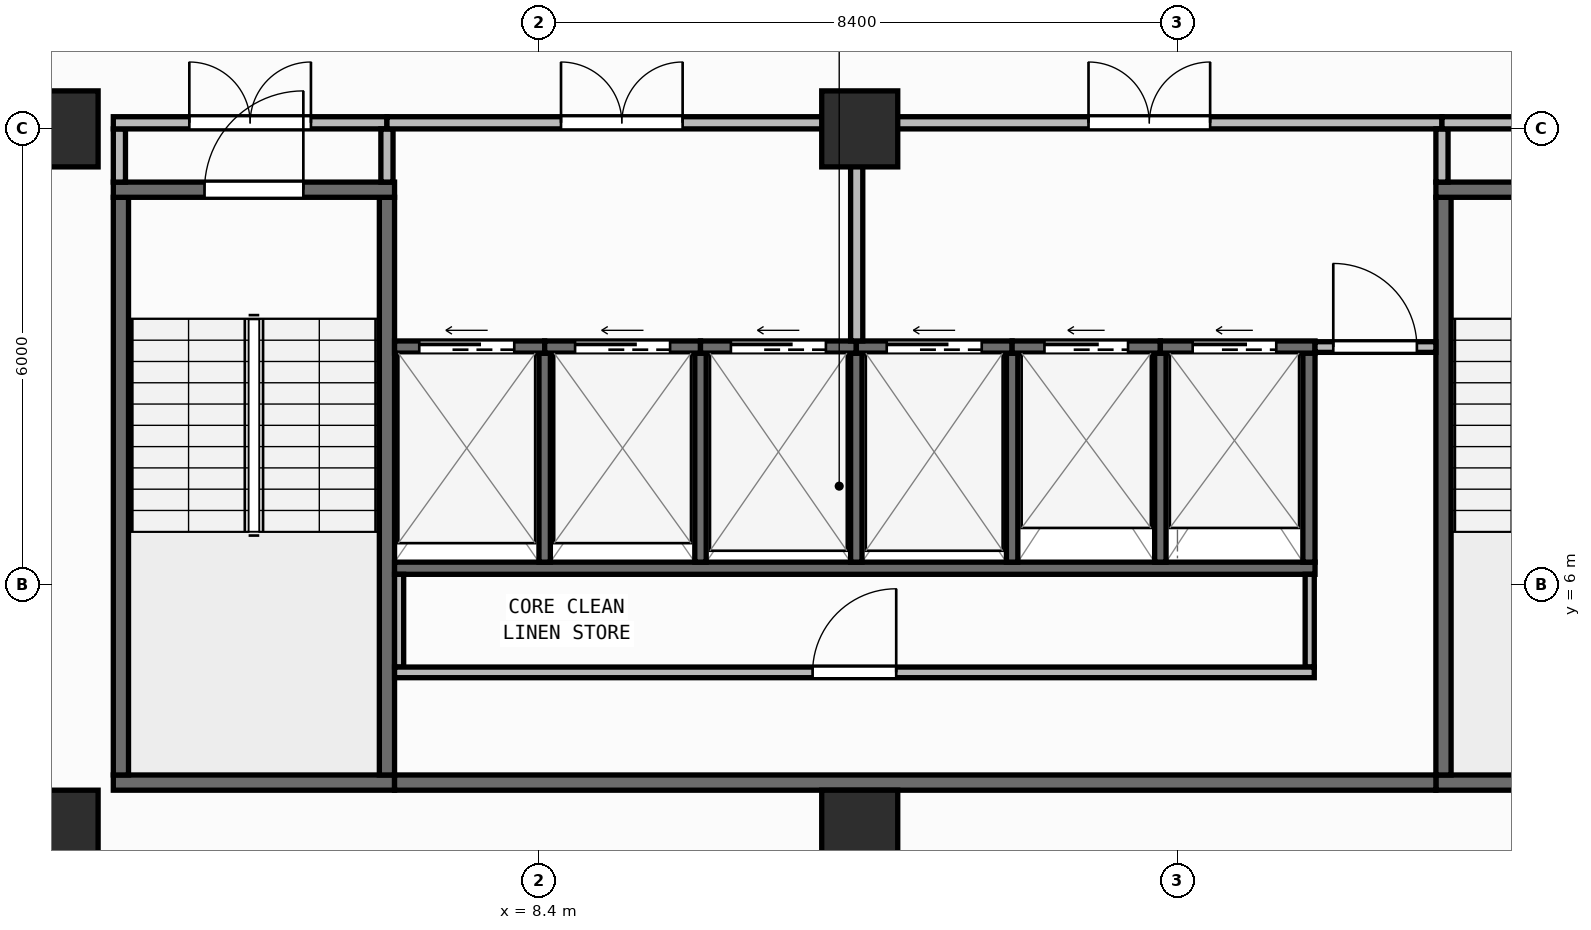
"""IFC4 building model, lengths in metres.
Left out: names, types, materials, properties, quantities, classifications, styles, units other than length and angle.
Written with IfcOpenShell. Run it as: python <this file> out.ifc"""

import sys

from ifc_helpers import new_model, si_unit, direction, frame, frame_2d, origin, origin_2d, place, context, subcontext, project, spatial, rectangle, extrude, element, fill, save


model = new_model("IFC4")
c1 = context("Model", 3, precision=1e-05, world=origin(), true_north=direction((0.0, 1.0)))
c2 = subcontext(c1, "Body", "Model", "MODEL_VIEW")
j1 = project(units=[si_unit("LENGTHUNIT", "METRE"), si_unit("PLANEANGLEUNIT", "RADIAN")], contexts=[c1])
p1 = place(None, origin())
s1 = spatial("IfcSite", under=j1, at=p1, CompositionType="ELEMENT")
p2 = place(p1, origin())
s2 = spatial("IfcBuilding", under=s1, at=p2, CompositionType="ELEMENT")
p3 = place(p2, frame((0.0, 0.0, 223.7)))
s3 = spatial("IfcBuildingStorey", under=s2, at=p3, CompositionType="ELEMENT", Elevation=223.7)
for number, where, z_axis, x_axis in (
    (1, (2.1, 2.8, 0.0), (0.0, 0.0, 1.0), (1.0, 0.0, 0.0)),
    (2, (12.62, 2.8, 0.0), (0.0, 0.0, 1.0), (1.0, 0.0, 0.0)),
    (3, (2.1, 12.0, 0.0), (0.0, 0.0, 1.0), (1.0, 0.0, 0.0)),
    (4, (12.62, 12.0, 0.0), (0.0, 0.0, 1.0), (1.0, 0.0, 0.0)),
):
    element("IfcColumn", number, at=place(p3, frame(where, z_axis=z_axis, x_axis=x_axis)), inside=s3, PredefinedType="COLUMN", context=c2, shape_type="SweptSolid", body=[
        extrude(rectangle(XDim=1.0, YDim=1.0, at=origin_2d()), origin(), (0.0, 0.0, 1.0), 3.95),
    ])
p4 = place(p3, frame((2.66, 0.174, 0.0), z_axis=(0.0, 0.0, 1.0), x_axis=(0.996634028439, 0.081979347142, 0.0)))
e5 = element("IfcWall", 5, at=p4, inside=s3, PredefinedType="STANDARD", context=c2, shape_type="SweptSolid", body=[
    extrude(rectangle(XDim=46.035, YDim=0.26, at=frame_2d((23.018, 0.0))), origin(), (0.0, 0.0, 1.0), 3.71),
])
p5 = place(p4, frame((21.817, 0.0, 0.9)))
e6 = element("IfcOpeningElement", 6, at=p5, cuts=e5, PredefinedType="OPENING", context=c2, shape_type="SweptSolid", body=[
    extrude(rectangle(XDim=2.4, YDim=1.65, at=frame_2d((1.2, 0.825))), frame((0.0, 0.14, 0.0), z_axis=(0.0, -1.0, 0.0), x_axis=(1.0, 0.0, 0.0)), (0.0, 0.0, 1.0), 0.28),
])
p6 = place(p3, frame((2.8, 3.4, 0.0), z_axis=(0.0, 0.0, 1.0), x_axis=(1.0, 0.0, 0.0)))
e7 = element("IfcWall", 7, at=p6, inside=s3, PredefinedType="SHEAR", context=c2, shape_type="SweptSolid", body=[
    extrude(rectangle(XDim=3.7, YDim=0.2, at=frame_2d((1.85, 0.0))), origin(), (0.0, 0.0, 1.0), 3.71),
])
for number, where, z_axis, x_axis in (
    (8, (2.9, 3.5, 0.0), (0.0, 0.0, 1.0), (0.0, 1.0, 0.0)),
    (9, (6.4, 3.5, 0.0), (0.0, 0.0, 1.0), (0.0, 1.0, 0.0)),
):
    element("IfcWall", number, at=place(p3, frame(where, z_axis=z_axis, x_axis=x_axis)), inside=s3, PredefinedType="SHEAR", context=c2, shape_type="SweptSolid", body=[
        extrude(rectangle(XDim=7.6, YDim=0.2, at=frame_2d((3.8, 0.0))), origin(), (0.0, 0.0, 1.0), 3.71),
    ])
p7 = place(p3, frame((2.8, 11.2, 0.0), z_axis=(0.0, 0.0, 1.0), x_axis=(1.0, 0.0, 0.0)))
e10 = element("IfcWall", 10, at=p7, inside=s3, PredefinedType="SHEAR", context=c2, shape_type="SweptSolid", body=[
    extrude(rectangle(XDim=3.7, YDim=0.2, at=frame_2d((1.85, 0.0))), origin(), (0.0, 0.0, 1.0), 3.71),
])
p8 = place(p7, frame((1.2, 0.0, 0.0)))
e11 = element("IfcOpeningElement", 11, at=p8, cuts=e10, PredefinedType="OPENING", context=c2, shape_type="SweptSolid", body=[
    extrude(rectangle(XDim=1.3, YDim=2.15, at=frame_2d((0.65, 1.075))), frame((0.0, 0.11, 0.0), z_axis=(0.0, -1.0, 0.0), x_axis=(1.0, 0.0, 0.0)), (0.0, 0.0, 1.0), 0.22),
])
p9 = place(p3, frame((20.2, 3.4, 0.0), z_axis=(0.0, 0.0, 1.0), x_axis=(1.0, 0.0, 0.0)))
e12 = element("IfcWall", 12, at=p9, inside=s3, PredefinedType="SHEAR", context=c2, shape_type="SweptSolid", body=[
    extrude(rectangle(XDim=3.7, YDim=0.2, at=frame_2d((1.85, 0.0))), origin(), (0.0, 0.0, 1.0), 3.71),
])
p10 = place(p3, frame((20.3, 3.5, 0.0), z_axis=(0.0, 0.0, 1.0), x_axis=(0.0, 1.0, 0.0)))
e13 = element("IfcWall", 13, at=p10, inside=s3, PredefinedType="SHEAR", context=c2, shape_type="SweptSolid", body=[
    extrude(rectangle(XDim=7.6, YDim=0.2, at=frame_2d((3.8, 0.0))), origin(), (0.0, 0.0, 1.0), 3.71),
])
p11 = place(p3, frame((20.2, 11.2, 0.0), z_axis=(0.0, 0.0, 1.0), x_axis=(1.0, 0.0, 0.0)))
e14 = element("IfcWall", 14, at=p11, inside=s3, PredefinedType="SHEAR", context=c2, shape_type="SweptSolid", body=[
    extrude(rectangle(XDim=3.7, YDim=0.2, at=frame_2d((1.85, 0.0))), origin(), (0.0, 0.0, 1.0), 3.71),
])
p12 = place(p11, frame((1.2, 0.0, 0.0)))
e15 = element("IfcOpeningElement", 15, at=p12, cuts=e14, PredefinedType="OPENING", context=c2, shape_type="SweptSolid", body=[
    extrude(rectangle(XDim=1.3, YDim=2.15, at=frame_2d((0.65, 1.075))), frame((0.0, 0.11, 0.0), z_axis=(0.0, -1.0, 0.0), x_axis=(1.0, 0.0, 0.0)), (0.0, 0.0, 1.0), 0.22),
])
p13 = place(p3, frame((6.5, 3.4, 0.0), z_axis=(0.0, 0.0, 1.0), x_axis=(1.0, 0.0, 0.0)))
e16 = element("IfcWall", 16, at=p13, inside=s3, PredefinedType="SHEAR", context=c2, shape_type="SweptSolid", body=[
    extrude(rectangle(XDim=13.7, YDim=0.2, at=frame_2d((6.85, 0.0))), origin(), (0.0, 0.0, 1.0), 3.71),
])
p14 = place(p3, frame((6.5, 6.22, 0.0), z_axis=(0.0, 0.0, 1.0), x_axis=(1.0, 0.0, 0.0)))
e17 = element("IfcWall", 17, at=p14, inside=s3, PredefinedType="SHEAR", context=c2, shape_type="SweptSolid", body=[
    extrude(rectangle(XDim=12.11, YDim=0.16, at=frame_2d((6.055, 0.0))), origin(), (0.0, 0.0, 1.0), 3.71),
])
p15 = place(p3, frame((18.53, 6.3, 0.0), z_axis=(0.0, 0.0, 1.0), x_axis=(0.0, 1.0, 0.0)))
e18 = element("IfcWall", 18, at=p15, inside=s3, PredefinedType="SHEAR", context=c2, shape_type="SweptSolid", body=[
    extrude(rectangle(XDim=2.75, YDim=0.16, at=frame_2d((1.375, 0.0))), origin(), (0.0, 0.0, 1.0), 3.71),
])
for number, where, z_axis, x_axis in (
    (19, (8.475, 6.3, 0.0), (0.0, 0.0, 1.0), (0.0, 1.0, 0.0)),
    (20, (10.525, 6.3, 0.0), (0.0, 0.0, 1.0), (0.0, 1.0, 0.0)),
    (21, (12.575, 6.3, 0.0), (0.0, 0.0, 1.0), (0.0, 1.0, 0.0)),
    (22, (14.625, 6.3, 0.0), (0.0, 0.0, 1.0), (0.0, 1.0, 0.0)),
    (23, (16.575, 6.3, 0.0), (0.0, 0.0, 1.0), (0.0, 1.0, 0.0)),
):
    element("IfcWall", number, at=place(p3, frame(where, z_axis=z_axis, x_axis=x_axis)), inside=s3, PredefinedType="SHEAR", context=c2, shape_type="SweptSolid", body=[
        extrude(rectangle(XDim=2.75, YDim=0.15, at=frame_2d((1.375, 0.0))), origin(), (0.0, 0.0, 1.0), 3.71),
    ])
p16 = place(p3, frame((6.5, 9.13, 0.0), z_axis=(0.0, 0.0, 1.0), x_axis=(1.0, 0.0, 0.0)))
e24 = element("IfcWall", 24, at=p16, inside=s3, PredefinedType="SHEAR", context=c2, shape_type="SweptSolid", body=[
    extrude(rectangle(XDim=1.975, YDim=0.16, at=frame_2d((0.988, 0.0))), origin(), (0.0, 0.0, 1.0), 3.71),
])
p17 = place(p16, frame((0.325, 0.0, 0.0)))
e25 = element("IfcOpeningElement", 25, at=p17, cuts=e24, PredefinedType="OPENING", context=c2, shape_type="SweptSolid", body=[
    extrude(rectangle(XDim=1.25, YDim=2.15, at=frame_2d((0.625, 1.075))), frame((0.0, 0.09, 0.0), z_axis=(0.0, -1.0, 0.0), x_axis=(1.0, 0.0, 0.0)), (0.0, 0.0, 1.0), 0.18),
])
p18 = place(p3, frame((8.475, 9.13, 0.0), z_axis=(0.0, 0.0, 1.0), x_axis=(1.0, 0.0, 0.0)))
e26 = element("IfcWall", 26, at=p18, inside=s3, PredefinedType="SHEAR", context=c2, shape_type="SweptSolid", body=[
    extrude(rectangle(XDim=2.05, YDim=0.16, at=frame_2d((1.025, 0.0))), origin(), (0.0, 0.0, 1.0), 3.71),
])
p19 = place(p18, frame((0.4, 0.0, 0.0)))
e27 = element("IfcOpeningElement", 27, at=p19, cuts=e26, PredefinedType="OPENING", context=c2, shape_type="SweptSolid", body=[
    extrude(rectangle(XDim=1.25, YDim=2.15, at=frame_2d((0.625, 1.075))), frame((0.0, 0.09, 0.0), z_axis=(0.0, -1.0, 0.0), x_axis=(1.0, 0.0, 0.0)), (0.0, 0.0, 1.0), 0.18),
])
p20 = place(p3, frame((10.525, 9.13, 0.0), z_axis=(0.0, 0.0, 1.0), x_axis=(1.0, 0.0, 0.0)))
e28 = element("IfcWall", 28, at=p20, inside=s3, PredefinedType="SHEAR", context=c2, shape_type="SweptSolid", body=[
    extrude(rectangle(XDim=2.05, YDim=0.16, at=frame_2d((1.025, 0.0))), origin(), (0.0, 0.0, 1.0), 3.71),
])
p21 = place(p20, frame((0.4, 0.0, 0.0)))
e29 = element("IfcOpeningElement", 29, at=p21, cuts=e28, PredefinedType="OPENING", context=c2, shape_type="SweptSolid", body=[
    extrude(rectangle(XDim=1.25, YDim=2.15, at=frame_2d((0.625, 1.075))), frame((0.0, 0.09, 0.0), z_axis=(0.0, -1.0, 0.0), x_axis=(1.0, 0.0, 0.0)), (0.0, 0.0, 1.0), 0.18),
])
p22 = place(p3, frame((12.575, 9.13, 0.0), z_axis=(0.0, 0.0, 1.0), x_axis=(1.0, 0.0, 0.0)))
e30 = element("IfcWall", 30, at=p22, inside=s3, PredefinedType="SHEAR", context=c2, shape_type="SweptSolid", body=[
    extrude(rectangle(XDim=2.05, YDim=0.16, at=frame_2d((1.025, 0.0))), origin(), (0.0, 0.0, 1.0), 3.71),
])
p23 = place(p22, frame((0.4, 0.0, 0.0)))
e31 = element("IfcOpeningElement", 31, at=p23, cuts=e30, PredefinedType="OPENING", context=c2, shape_type="SweptSolid", body=[
    extrude(rectangle(XDim=1.25, YDim=2.15, at=frame_2d((0.625, 1.075))), frame((0.0, 0.09, 0.0), z_axis=(0.0, -1.0, 0.0), x_axis=(1.0, 0.0, 0.0)), (0.0, 0.0, 1.0), 0.18),
])
p24 = place(p3, frame((14.625, 9.13, 0.0), z_axis=(0.0, 0.0, 1.0), x_axis=(1.0, 0.0, 0.0)))
e32 = element("IfcWall", 32, at=p24, inside=s3, PredefinedType="SHEAR", context=c2, shape_type="SweptSolid", body=[
    extrude(rectangle(XDim=1.95, YDim=0.16, at=frame_2d((0.975, 0.0))), origin(), (0.0, 0.0, 1.0), 3.71),
])
p25 = place(p24, frame((0.425, 0.0, 0.0)))
e33 = element("IfcOpeningElement", 33, at=p25, cuts=e32, PredefinedType="OPENING", context=c2, shape_type="SweptSolid", body=[
    extrude(rectangle(XDim=1.1, YDim=2.15, at=frame_2d((0.55, 1.075))), frame((0.0, 0.09, 0.0), z_axis=(0.0, -1.0, 0.0), x_axis=(1.0, 0.0, 0.0)), (0.0, 0.0, 1.0), 0.18),
])
p26 = place(p3, frame((16.575, 9.13, 0.0), z_axis=(0.0, 0.0, 1.0), x_axis=(1.0, 0.0, 0.0)))
e34 = element("IfcWall", 34, at=p26, inside=s3, PredefinedType="SHEAR", context=c2, shape_type="SweptSolid", body=[
    extrude(rectangle(XDim=2.035, YDim=0.16, at=frame_2d((1.018, 0.0))), origin(), (0.0, 0.0, 1.0), 3.71),
])
p27 = place(p26, frame((0.425, 0.0, 0.0)))
e35 = element("IfcOpeningElement", 35, at=p27, cuts=e34, PredefinedType="OPENING", context=c2, shape_type="SweptSolid", body=[
    extrude(rectangle(XDim=1.1, YDim=2.15, at=frame_2d((0.55, 1.075))), frame((0.0, 0.09, 0.0), z_axis=(0.0, -1.0, 0.0), x_axis=(1.0, 0.0, 0.0)), (0.0, 0.0, 1.0), 0.18),
])
for number, where, z_axis, x_axis in (
    (36, (6.56, 4.92, 0.0), (0.0, 0.0, 1.0), (0.0, 1.0, 0.0)),
    (37, (18.54, 4.92, 0.0), (0.0, 0.0, 1.0), (0.0, 1.0, 0.0)),
):
    element("IfcWall", number, at=place(p3, frame(where, z_axis=z_axis, x_axis=x_axis)), inside=s3, PredefinedType="PARTITIONING", context=c2, shape_type="SweptSolid", body=[
        extrude(rectangle(XDim=1.22, YDim=0.12, at=frame_2d((0.61, 0.0))), origin(), (0.0, 0.0, 1.0), 3.71),
    ])
p28 = place(p3, frame((6.5, 4.85, 0.0), z_axis=(0.0, 0.0, 1.0), x_axis=(1.0, 0.0, 0.0)))
e38 = element("IfcWall", 38, at=p28, inside=s3, PredefinedType="PARTITIONING", context=c2, shape_type="SweptSolid", body=[
    extrude(rectangle(XDim=12.1, YDim=0.14, at=frame_2d((6.05, 0.0))), origin(), (0.0, 0.0, 1.0), 3.71),
])
p29 = place(p28, frame((5.5, 0.0, 0.0)))
e39 = element("IfcOpeningElement", 39, at=p29, cuts=e38, PredefinedType="OPENING", context=c2, shape_type="SweptSolid", body=[
    extrude(rectangle(XDim=1.1, YDim=2.1, at=frame_2d((0.55, 1.05))), frame((0.0, 0.08, 0.0), z_axis=(0.0, -1.0, 0.0), x_axis=(1.0, 0.0, 0.0)), (0.0, 0.0, 1.0), 0.16),
])
p30 = place(p3, frame((18.61, 9.13, 0.0), z_axis=(0.0, 0.0, 1.0), x_axis=(1.0, 0.0, 0.0)))
e40 = element("IfcWall", 40, at=p30, inside=s3, PredefinedType="PARTITIONING", context=c2, shape_type="SweptSolid", body=[
    extrude(rectangle(XDim=1.59, YDim=0.14, at=frame_2d((0.795, 0.0))), origin(), (0.0, 0.0, 1.0), 3.71),
])
p31 = place(p30, frame((0.24, 0.0, 0.0)))
e41 = element("IfcOpeningElement", 41, at=p31, cuts=e40, PredefinedType="OPENING", context=c2, shape_type="SweptSolid", body=[
    extrude(rectangle(XDim=1.1, YDim=2.1, at=frame_2d((0.55, 1.05))), frame((0.0, 0.08, 0.0), z_axis=(0.0, -1.0, 0.0), x_axis=(1.0, 0.0, 0.0)), (0.0, 0.0, 1.0), 0.16),
])
p32 = place(p3, frame((2.88, 11.3, 0.0), z_axis=(0.0, 0.0, 1.0), x_axis=(0.0, 1.0, 0.0)))
e42 = element("IfcWall", 42, at=p32, inside=s3, PredefinedType="PARTITIONING", context=c2, shape_type="SweptSolid", body=[
    extrude(rectangle(XDim=0.7, YDim=0.16, at=frame_2d((0.35, 0.0))), origin(), (0.0, 0.0, 1.0), 3.71),
])
p33 = place(p3, frame((2.8, 12.08, 0.0), z_axis=(0.0, 0.0, 1.0), x_axis=(1.0, 0.0, 0.0)))
e43 = element("IfcWall", 43, at=p33, inside=s3, PredefinedType="PARTITIONING", context=c2, shape_type="SweptSolid", body=[
    extrude(rectangle(XDim=3.6, YDim=0.16, at=frame_2d((1.8, 0.0))), origin(), (0.0, 0.0, 1.0), 3.152),
])
p34 = place(p33, frame((1.0, 0.0, 0.0)))
e44 = element("IfcOpeningElement", 44, at=p34, cuts=e43, PredefinedType="OPENING", context=c2, shape_type="SweptSolid", body=[
    extrude(rectangle(XDim=1.6, YDim=2.05, at=frame_2d((0.8, 1.025))), frame((0.0, 0.09, 0.0), z_axis=(0.0, -1.0, 0.0), x_axis=(1.0, 0.0, 0.0)), (0.0, 0.0, 1.0), 0.18),
])
p35 = place(p3, frame((6.4, 11.3, 0.0), z_axis=(0.0, 0.0, 1.0), x_axis=(0.0, 1.0, 0.0)))
e45 = element("IfcWall", 45, at=p35, inside=s3, PredefinedType="PARTITIONING", context=c2, shape_type="SweptSolid", body=[
    extrude(rectangle(XDim=0.7, YDim=0.16, at=frame_2d((0.35, 0.0))), origin(), (0.0, 0.0, 1.0), 3.71),
])
p36 = place(p3, frame((6.4, 12.08, 0.0), z_axis=(0.0, 0.0, 1.0), x_axis=(1.0, 0.0, 0.0)))
e46 = element("IfcWall", 46, at=p36, inside=s3, PredefinedType="PARTITIONING", context=c2, shape_type="SweptSolid", body=[
    extrude(rectangle(XDim=6.18, YDim=0.16, at=frame_2d((3.09, 0.0))), origin(), (0.0, 0.0, 1.0), 3.152),
])
p37 = place(p36, frame((2.29, 0.0, 0.0)))
e47 = element("IfcOpeningElement", 47, at=p37, cuts=e46, PredefinedType="OPENING", context=c2, shape_type="SweptSolid", body=[
    extrude(rectangle(XDim=1.6, YDim=2.05, at=frame_2d((0.8, 1.025))), frame((0.0, 0.09, 0.0), z_axis=(0.0, -1.0, 0.0), x_axis=(1.0, 0.0, 0.0)), (0.0, 0.0, 1.0), 0.18),
])
p38 = place(p3, frame((12.58, 9.21, 0.0), z_axis=(0.0, 0.0, 1.0), x_axis=(0.0, 1.0, 0.0)))
e48 = element("IfcWall", 48, at=p38, inside=s3, PredefinedType="PARTITIONING", context=c2, shape_type="SweptSolid", body=[
    extrude(rectangle(XDim=2.79, YDim=0.16, at=frame_2d((1.395, 0.0))), origin(), (0.0, 0.0, 1.0), 3.71),
])
p39 = place(p3, frame((12.58, 12.08, 0.0), z_axis=(0.0, 0.0, 1.0), x_axis=(1.0, 0.0, 0.0)))
e49 = element("IfcWall", 49, at=p39, inside=s3, PredefinedType="PARTITIONING", context=c2, shape_type="SweptSolid", body=[
    extrude(rectangle(XDim=7.7, YDim=0.16, at=frame_2d((3.85, 0.0))), origin(), (0.0, 0.0, 1.0), 3.152),
])
p40 = place(p39, frame((3.05, 0.0, 0.0)))
e50 = element("IfcOpeningElement", 50, at=p40, cuts=e49, PredefinedType="OPENING", context=c2, shape_type="SweptSolid", body=[
    extrude(rectangle(XDim=1.6, YDim=2.05, at=frame_2d((0.8, 1.025))), frame((0.0, 0.09, 0.0), z_axis=(0.0, -1.0, 0.0), x_axis=(1.0, 0.0, 0.0)), (0.0, 0.0, 1.0), 0.18),
])
p41 = place(p3, frame((20.28, 11.3, 0.0), z_axis=(0.0, 0.0, 1.0), x_axis=(0.0, 1.0, 0.0)))
e51 = element("IfcWall", 51, at=p41, inside=s3, PredefinedType="PARTITIONING", context=c2, shape_type="SweptSolid", body=[
    extrude(rectangle(XDim=0.7, YDim=0.16, at=frame_2d((0.35, 0.0))), origin(), (0.0, 0.0, 1.0), 3.71),
])
p42 = place(p3, frame((20.28, 12.08, 0.0), z_axis=(0.0, 0.0, 1.0), x_axis=(1.0, 0.0, 0.0)))
e52 = element("IfcWall", 52, at=p42, inside=s3, PredefinedType="PARTITIONING", context=c2, shape_type="SweptSolid", body=[
    extrude(rectangle(XDim=3.62, YDim=0.16, at=frame_2d((1.81, 0.0))), origin(), (0.0, 0.0, 1.0), 3.152),
])
p43 = place(p42, frame((1.01, 0.0, 0.0)))
e53 = element("IfcOpeningElement", 53, at=p43, cuts=e52, PredefinedType="OPENING", context=c2, shape_type="SweptSolid", body=[
    extrude(rectangle(XDim=1.6, YDim=2.05, at=frame_2d((0.8, 1.025))), frame((0.0, 0.09, 0.0), z_axis=(0.0, -1.0, 0.0), x_axis=(1.0, 0.0, 0.0)), (0.0, 0.0, 1.0), 0.18),
])
p44 = place(p8, origin())
e54 = element("IfcDoor", 54, at=p44, inside=s3, OperationType="SINGLE_SWING_RIGHT", PredefinedType="DOOR", context=c2, shape_type="SweptSolid", body=[
    extrude(rectangle(XDim=1.3, YDim=2.15, at=frame_2d((0.65, 1.075))), frame((0.0, 0.025, 0.0), z_axis=(0.0, -1.0, 0.0), x_axis=(1.0, 0.0, 0.0)), (0.0, 0.0, 1.0), 0.05),
])
fill(e11, e54)
p45 = place(p17, origin())
e55 = element("IfcDoor", 55, at=p45, inside=s3, OperationType="SLIDING_TO_LEFT", PredefinedType="DOOR", context=c2, shape_type="SweptSolid", body=[
    extrude(rectangle(XDim=1.25, YDim=2.15, at=frame_2d((0.625, 1.075))), frame((0.0, 0.025, 0.0), z_axis=(0.0, -1.0, 0.0), x_axis=(1.0, 0.0, 0.0)), (0.0, 0.0, 1.0), 0.05),
])
fill(e25, e55)
p46 = place(p19, origin())
e56 = element("IfcDoor", 56, at=p46, inside=s3, OperationType="SLIDING_TO_LEFT", PredefinedType="DOOR", context=c2, shape_type="SweptSolid", body=[
    extrude(rectangle(XDim=1.25, YDim=2.15, at=frame_2d((0.625, 1.075))), frame((0.0, 0.025, 0.0), z_axis=(0.0, -1.0, 0.0), x_axis=(1.0, 0.0, 0.0)), (0.0, 0.0, 1.0), 0.05),
])
fill(e27, e56)
p47 = place(p21, origin())
e57 = element("IfcDoor", 57, at=p47, inside=s3, OperationType="SLIDING_TO_LEFT", PredefinedType="DOOR", context=c2, shape_type="SweptSolid", body=[
    extrude(rectangle(XDim=1.25, YDim=2.15, at=frame_2d((0.625, 1.075))), frame((0.0, 0.025, 0.0), z_axis=(0.0, -1.0, 0.0), x_axis=(1.0, 0.0, 0.0)), (0.0, 0.0, 1.0), 0.05),
])
fill(e29, e57)
p48 = place(p23, origin())
e58 = element("IfcDoor", 58, at=p48, inside=s3, OperationType="SLIDING_TO_LEFT", PredefinedType="DOOR", context=c2, shape_type="SweptSolid", body=[
    extrude(rectangle(XDim=1.25, YDim=2.15, at=frame_2d((0.625, 1.075))), frame((0.0, 0.025, 0.0), z_axis=(0.0, -1.0, 0.0), x_axis=(1.0, 0.0, 0.0)), (0.0, 0.0, 1.0), 0.05),
])
fill(e31, e58)
p49 = place(p25, origin())
e59 = element("IfcDoor", 59, at=p49, inside=s3, OperationType="SLIDING_TO_LEFT", PredefinedType="DOOR", context=c2, shape_type="SweptSolid", body=[
    extrude(rectangle(XDim=1.1, YDim=2.15, at=frame_2d((0.55, 1.075))), frame((0.0, 0.025, 0.0), z_axis=(0.0, -1.0, 0.0), x_axis=(1.0, 0.0, 0.0)), (0.0, 0.0, 1.0), 0.05),
])
fill(e33, e59)
p50 = place(p27, origin())
e60 = element("IfcDoor", 60, at=p50, inside=s3, OperationType="SLIDING_TO_LEFT", PredefinedType="DOOR", context=c2, shape_type="SweptSolid", body=[
    extrude(rectangle(XDim=1.1, YDim=2.15, at=frame_2d((0.55, 1.075))), frame((0.0, 0.025, 0.0), z_axis=(0.0, -1.0, 0.0), x_axis=(1.0, 0.0, 0.0)), (0.0, 0.0, 1.0), 0.05),
])
fill(e35, e60)
p51 = place(p29, origin())
e61 = element("IfcDoor", 61, at=p51, inside=s3, OperationType="SINGLE_SWING_RIGHT", PredefinedType="DOOR", context=c2, shape_type="SweptSolid", body=[
    extrude(rectangle(XDim=1.1, YDim=2.1, at=frame_2d((0.55, 1.05))), frame((0.0, 0.025, 0.0), z_axis=(0.0, -1.0, 0.0), x_axis=(1.0, 0.0, 0.0)), (0.0, 0.0, 1.0), 0.05),
])
fill(e39, e61)
p52 = place(p31, origin())
e62 = element("IfcDoor", 62, at=p52, inside=s3, OperationType="SINGLE_SWING_LEFT", PredefinedType="DOOR", context=c2, shape_type="SweptSolid", body=[
    extrude(rectangle(XDim=1.1, YDim=2.1, at=frame_2d((0.55, 1.05))), frame((0.0, 0.025, 0.0), z_axis=(0.0, -1.0, 0.0), x_axis=(1.0, 0.0, 0.0)), (0.0, 0.0, 1.0), 0.05),
])
fill(e41, e62)
p53 = place(p34, origin())
e63 = element("IfcDoor", 63, at=p53, inside=s3, OperationType="DOUBLE_DOOR_SINGLE_SWING", PredefinedType="DOOR", context=c2, shape_type="SweptSolid", body=[
    extrude(rectangle(XDim=1.6, YDim=2.05, at=frame_2d((0.8, 1.025))), frame((0.0, 0.025, 0.0), z_axis=(0.0, -1.0, 0.0), x_axis=(1.0, 0.0, 0.0)), (0.0, 0.0, 1.0), 0.05),
])
fill(e44, e63)
p54 = place(p37, origin())
e64 = element("IfcDoor", 64, at=p54, inside=s3, OperationType="DOUBLE_DOOR_SINGLE_SWING", PredefinedType="DOOR", context=c2, shape_type="SweptSolid", body=[
    extrude(rectangle(XDim=1.6, YDim=2.05, at=frame_2d((0.8, 1.025))), frame((0.0, 0.025, 0.0), z_axis=(0.0, -1.0, 0.0), x_axis=(1.0, 0.0, 0.0)), (0.0, 0.0, 1.0), 0.05),
])
fill(e47, e64)
p55 = place(p40, origin())
e65 = element("IfcDoor", 65, at=p55, inside=s3, OperationType="DOUBLE_DOOR_SINGLE_SWING", PredefinedType="DOOR", context=c2, shape_type="SweptSolid", body=[
    extrude(rectangle(XDim=1.6, YDim=2.05, at=frame_2d((0.8, 1.025))), frame((0.0, 0.025, 0.0), z_axis=(0.0, -1.0, 0.0), x_axis=(1.0, 0.0, 0.0)), (0.0, 0.0, 1.0), 0.05),
])
fill(e50, e65)
save(model, sys.argv[1])
